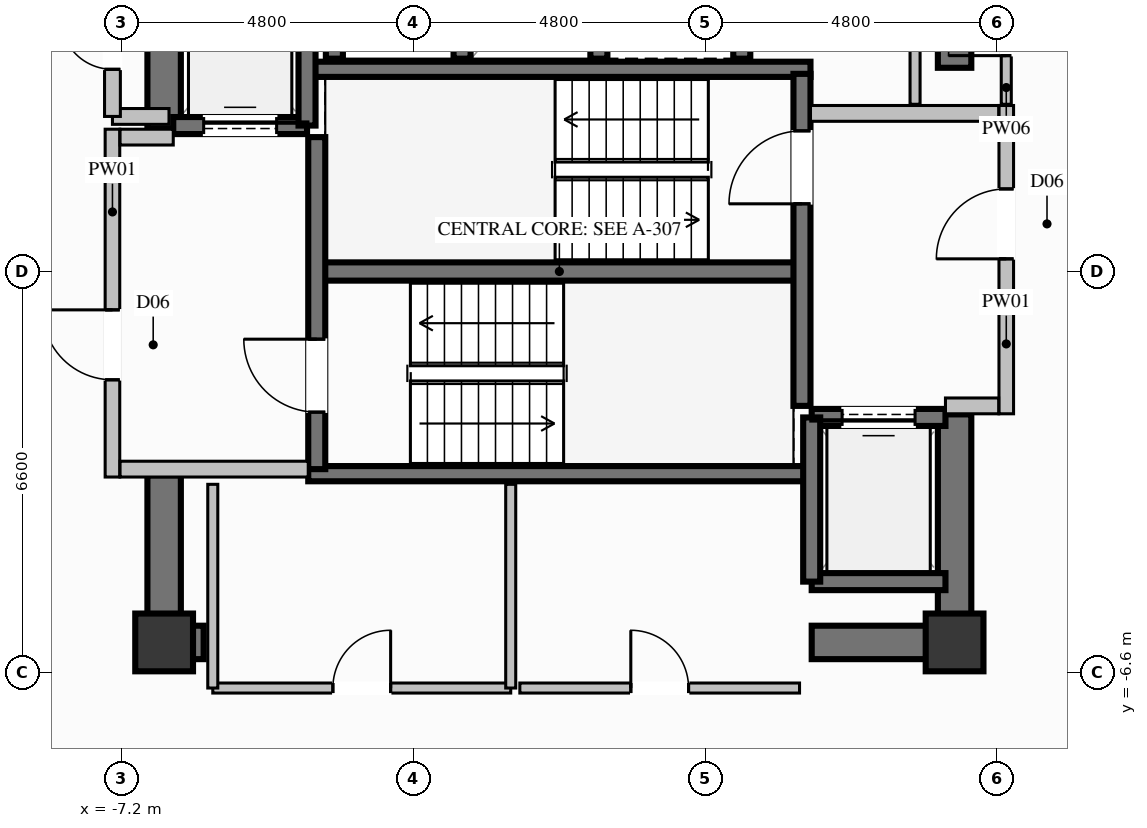
"""IFC4 building model, lengths in metres.
Left out: names, types, materials, properties, quantities, classifications, styles, units other than length and angle.
Written with IfcOpenShell. Run it as: python <this file> out.ifc"""

import sys

from ifc_helpers import new_model, si_unit, direction, frame, frame_2d, origin, origin_2d, place, context, subcontext, project, spatial, rectangle, extrude, element, fill, save


model = new_model("IFC4")
c1 = context("Model", 3, precision=1e-05, world=origin(), true_north=direction((0.0, 1.0)))
c2 = subcontext(c1, "Body", "Model", "MODEL_VIEW")
j1 = project(units=[si_unit("LENGTHUNIT", "METRE"), si_unit("PLANEANGLEUNIT", "RADIAN")], contexts=[c1])
p1 = place(None, origin())
s1 = spatial("IfcSite", under=j1, at=p1, CompositionType="ELEMENT")
p2 = place(p1, origin())
s2 = spatial("IfcBuilding", under=s1, at=p2, CompositionType="ELEMENT")
p3 = place(p2, frame((0.0, 0.0, 212.8)))
s3 = spatial("IfcBuildingStorey", under=s2, at=p3, CompositionType="ELEMENT", Elevation=212.8)
for number, where, z_axis, x_axis in (
    (1, (-6.5, -6.1, 0.0), (0.0, 0.0, 1.0), (1.0, 0.0, 0.0)),
    (2, (6.5, -6.1, 0.0), (0.0, 0.0, 1.0), (1.0, 0.0, 0.0)),
):
    element("IfcColumn", number, at=place(p3, frame(where, z_axis=z_axis, x_axis=x_axis)), inside=s3, PredefinedType="COLUMN", context=c2, shape_type="SweptSolid", body=[
        extrude(rectangle(XDim=0.95, YDim=0.95, at=origin_2d()), origin(), (0.0, 0.0, 1.0), 3.6),
    ])
p4 = place(p3, frame((-3.99, 0.0, 0.0), z_axis=(0.0, 0.0, 1.0), x_axis=(1.0, 0.0, 0.0)))
e3 = element("IfcWall", 3, at=p4, inside=s3, PredefinedType="SHEAR", context=c2, shape_type="SweptSolid", body=[
    extrude(rectangle(XDim=7.98, YDim=0.3, at=frame_2d((3.99, 0.0))), origin(), (0.0, 0.0, 1.0), 3.6),
])
for number, where, z_axis, x_axis in (
    (4, (-4.13, -3.325, 0.0), (0.0, 0.0, 1.0), (1.0, 0.0, 0.0)),
    (5, (-4.13, 3.325, 0.0), (0.0, 0.0, 1.0), (1.0, 0.0, 0.0)),
):
    element("IfcWall", number, at=place(p3, frame(where, z_axis=z_axis, x_axis=x_axis)), inside=s3, PredefinedType="SOLIDWALL", context=c2, shape_type="SweptSolid", body=[
        extrude(rectangle(XDim=8.26, YDim=0.25, at=frame_2d((4.13, 0.0))), origin(), (0.0, 0.0, 1.0), 3.6),
    ])
p5 = place(p3, frame((-6.225, -6.1, 0.0), z_axis=(0.0, 0.0, 1.0), x_axis=(1.0, 0.0, 0.0)))
e6 = element("IfcWall", 6, at=p5, inside=s3, PredefinedType="SHEAR", context=c2, shape_type="SweptSolid", body=[
    extrude(rectangle(XDim=0.375, YDim=0.55, at=frame_2d((0.188, 0.0))), origin(), (0.0, 0.0, 1.0), 3.6),
])
p6 = place(p3, frame((4.15, -6.1, 0.0), z_axis=(0.0, 0.0, 1.0), x_axis=(1.0, 0.0, 0.0)))
e7 = element("IfcWall", 7, at=p6, inside=s3, PredefinedType="SHEAR", context=c2, shape_type="SweptSolid", body=[
    extrude(rectangle(XDim=2.075, YDim=0.55, at=frame_2d((1.038, 0.0))), origin(), (0.0, 0.0, 1.0), 3.6),
])
p7 = place(p3, frame((-6.5, 2.35, 0.0), z_axis=(0.0, 0.0, 1.0), x_axis=(0.0, 1.0, 0.0)))
e8 = element("IfcWall", 8, at=p7, inside=s3, PredefinedType="SHEAR", context=c2, shape_type="SweptSolid", body=[
    extrude(rectangle(XDim=4.025, YDim=0.55, at=frame_2d((2.012, 0.0))), origin(), (0.0, 0.0, 1.0), 3.6),
])
p8 = place(p3, frame((-6.5, -6.375, 0.0), z_axis=(0.0, 0.0, 1.0), x_axis=(0.0, 1.0, 0.0)))
e9 = element("IfcWall", 9, at=p8, inside=s3, PredefinedType="SHEAR", context=c2, shape_type="SweptSolid", body=[
    extrude(rectangle(XDim=3.025, YDim=0.55, at=frame_2d((1.512, 0.0))), origin(), (0.0, 0.0, 1.0), 3.6),
])
p9 = place(p3, frame((6.5, -6.375, 0.0), z_axis=(0.0, 0.0, 1.0), x_axis=(0.0, 1.0, 0.0)))
e10 = element("IfcWall", 10, at=p9, inside=s3, PredefinedType="SHEAR", context=c2, shape_type="SweptSolid", body=[
    extrude(rectangle(XDim=4.025, YDim=0.55, at=frame_2d((2.012, 0.0))), origin(), (0.0, 0.0, 1.0), 3.6),
])
p10 = place(p3, frame((6.5, 3.35, 0.0), z_axis=(0.0, 0.0, 1.0), x_axis=(0.0, 1.0, 0.0)))
e11 = element("IfcWall", 11, at=p10, inside=s3, PredefinedType="SHEAR", context=c2, shape_type="SweptSolid", body=[
    extrude(rectangle(XDim=3.025, YDim=0.55, at=frame_2d((1.512, 0.0))), origin(), (0.0, 0.0, 1.0), 3.6),
])
for number, where, z_axis, x_axis in (
    (12, (-3.7, 6.0, 0.0), (0.0, 0.0, 1.0), (0.0, -1.0, 0.0)),
    (13, (-1.6, 3.5, 0.0), (0.0, 0.0, 1.0), (0.0, 1.0, 0.0)),
    (14, (0.65, 3.5, 0.0), (0.0, 0.0, 1.0), (0.0, 1.0, 0.0)),
    (15, (3.0, 3.5, 0.0), (0.0, 0.0, 1.0), (0.0, 1.0, 0.0)),
):
    element("IfcWall", number, at=place(p3, frame(where, z_axis=z_axis, x_axis=x_axis)), inside=s3, PredefinedType="SOLIDWALL", context=c2, shape_type="SweptSolid", body=[
        extrude(rectangle(XDim=2.5, YDim=0.28, at=frame_2d((1.25, 0.0))), origin(), (0.0, 0.0, 1.0), 3.36),
    ])
p11 = place(p3, frame((-6.35, 2.4, 0.0), z_axis=(0.0, 0.0, 1.0), x_axis=(1.0, 0.0, 0.0)))
e16 = element("IfcWall", 16, at=p11, inside=s3, PredefinedType="SOLIDWALL", context=c2, shape_type="SweptSolid", body=[
    extrude(rectangle(XDim=2.2, YDim=0.28, at=frame_2d((1.1, 0.0))), origin(), (0.0, 0.0, 1.0), 3.36),
])
p12 = place(p11, frame((0.5, 0.0, 0.0)))
e17 = element("IfcOpeningElement", 17, at=p12, cuts=e16, PredefinedType="OPENING", context=c2, shape_type="SweptSolid", body=[
    extrude(rectangle(XDim=1.2, YDim=2.2, at=frame_2d((0.6, 1.1))), frame((0.0, 0.15, 0.0), z_axis=(0.0, -1.0, 0.0), x_axis=(1.0, 0.0, 0.0)), (0.0, 0.0, 1.0), 0.3),
])
p13 = place(p3, frame((-4.15, 2.4, 0.0), z_axis=(0.0, 0.0, 1.0), x_axis=(0.0, 1.0, 0.0)))
e18 = element("IfcWall", 18, at=p13, inside=s3, PredefinedType="SOLIDWALL", context=c2, shape_type="SweptSolid", body=[
    extrude(rectangle(XDim=2.7, YDim=0.28, at=frame_2d((1.35, 0.0))), origin(), (0.0, 0.0, 1.0), 3.36),
])
p14 = place(p3, frame((4.15, -5.1, 0.0), z_axis=(0.0, 0.0, 1.0), x_axis=(1.0, 0.0, 0.0)))
e19 = element("IfcWall", 19, at=p14, inside=s3, PredefinedType="SOLIDWALL", context=c2, shape_type="SweptSolid", body=[
    extrude(rectangle(XDim=2.2, YDim=0.28, at=frame_2d((1.1, 0.0))), origin(), (0.0, 0.0, 1.0), 3.36),
])
p15 = place(p3, frame((6.35, -2.4, 0.0), z_axis=(0.0, 0.0, 1.0), x_axis=(-1.0, 0.0, 0.0)))
e20 = element("IfcWall", 20, at=p15, inside=s3, PredefinedType="SOLIDWALL", context=c2, shape_type="SweptSolid", body=[
    extrude(rectangle(XDim=2.2, YDim=0.28, at=frame_2d((1.1, 0.0))), origin(), (0.0, 0.0, 1.0), 3.36),
])
p16 = place(p15, frame((0.5, 0.0, 0.0)))
e21 = element("IfcOpeningElement", 21, at=p16, cuts=e20, PredefinedType="OPENING", context=c2, shape_type="SweptSolid", body=[
    extrude(rectangle(XDim=1.2, YDim=2.2, at=frame_2d((0.6, 1.1))), frame((0.0, 0.15, 0.0), z_axis=(0.0, -1.0, 0.0), x_axis=(1.0, 0.0, 0.0)), (0.0, 0.0, 1.0), 0.3),
])
p17 = place(p3, frame((4.15, -2.4, 0.0), z_axis=(0.0, 0.0, 1.0), x_axis=(0.0, -1.0, 0.0)))
e22 = element("IfcWall", 22, at=p17, inside=s3, PredefinedType="SOLIDWALL", context=c2, shape_type="SweptSolid", body=[
    extrude(rectangle(XDim=2.7, YDim=0.28, at=frame_2d((1.35, 0.0))), origin(), (0.0, 0.0, 1.0), 3.36),
])
p18 = place(p3, frame((-3.99, -3.25, 0.0), z_axis=(0.0, 0.0, 1.0), x_axis=(0.0, 1.0, 0.0)))
e23 = element("IfcWall", 23, at=p18, inside=s3, PredefinedType="SOLIDWALL", context=c2, shape_type="SweptSolid", body=[
    extrude(rectangle(XDim=5.46, YDim=0.28, at=frame_2d((2.73, 0.0))), origin(), (0.0, 0.0, 1.0), 3.36),
])
p19 = place(p18, frame((0.937, 0.0, 0.0)))
e24 = element("IfcOpeningElement", 24, at=p19, cuts=e23, PredefinedType="OPENING", context=c2, shape_type="SweptSolid", body=[
    extrude(rectangle(XDim=1.2, YDim=2.2, at=frame_2d((0.6, 1.1))), frame((0.0, 0.15, 0.0), z_axis=(0.0, -1.0, 0.0), x_axis=(1.0, 0.0, 0.0)), (0.0, 0.0, 1.0), 0.3),
])
p20 = place(p3, frame((3.99, -2.21, 0.0), z_axis=(0.0, 0.0, 1.0), x_axis=(0.0, 1.0, 0.0)))
e25 = element("IfcWall", 25, at=p20, inside=s3, PredefinedType="SOLIDWALL", context=c2, shape_type="SweptSolid", body=[
    extrude(rectangle(XDim=5.46, YDim=0.28, at=frame_2d((2.73, 0.0))), origin(), (0.0, 0.0, 1.0), 3.36),
])
p21 = place(p20, frame((3.323, 0.0, 0.0)))
e26 = element("IfcOpeningElement", 26, at=p21, cuts=e25, PredefinedType="OPENING", context=c2, shape_type="SweptSolid", body=[
    extrude(rectangle(XDim=1.2, YDim=2.2, at=frame_2d((0.6, 1.1))), frame((0.0, 0.15, 0.0), z_axis=(0.0, -1.0, 0.0), x_axis=(1.0, 0.0, 0.0)), (0.0, 0.0, 1.0), 0.3),
])
p22 = place(p3, frame((-7.35, -3.38, 0.0), z_axis=(0.0, 0.0, 1.0), x_axis=(0.0, 1.0, 0.0)))
e27 = element("IfcWall", 27, at=p22, inside=s3, PredefinedType="PARTITIONING", context=c2, shape_type="SweptSolid", body=[
    extrude(rectangle(XDim=5.72, YDim=0.24, at=frame_2d((2.86, 0.0))), origin(), (0.0, 0.0, 1.0), 2.445),
])
p23 = place(p22, frame((1.599, 0.0, 0.0)))
e28 = element("IfcOpeningElement", 28, at=p23, cuts=e27, PredefinedType="OPENING", context=c2, shape_type="SweptSolid", body=[
    extrude(rectangle(XDim=1.15, YDim=2.2, at=frame_2d((0.575, 1.1))), frame((0.0, 0.13, 0.0), z_axis=(0.0, -1.0, 0.0), x_axis=(1.0, 0.0, 0.0)), (0.0, 0.0, 1.0), 0.26),
])
p24 = place(p3, frame((-7.225, -3.25, 0.0), z_axis=(0.0, 0.0, 1.0), x_axis=(1.0, 0.0, 0.0)))
e29 = element("IfcWall", 29, at=p24, inside=s3, PredefinedType="PARTITIONING", context=c2, shape_type="SweptSolid", body=[
    extrude(rectangle(XDim=3.095, YDim=0.26, at=frame_2d((1.548, 0.0))), origin(), (0.0, 0.0, 1.0), 3.36),
])
p25 = place(p3, frame((-7.225, 2.21, 0.0), z_axis=(0.0, 0.0, 1.0), x_axis=(1.0, 0.0, 0.0)))
e30 = element("IfcWall", 30, at=p25, inside=s3, PredefinedType="PARTITIONING", context=c2, shape_type="SweptSolid", body=[
    extrude(rectangle(XDim=0.875, YDim=0.26, at=frame_2d((0.438, 0.0))), origin(), (0.0, 0.0, 1.0), 3.36),
])
p26 = place(p3, frame((7.35, -2.34, 0.0), z_axis=(0.0, 0.0, 1.0), x_axis=(0.0, 1.0, 0.0)))
e31 = element("IfcWall", 31, at=p26, inside=s3, PredefinedType="PARTITIONING", context=c2, shape_type="SweptSolid", body=[
    extrude(rectangle(XDim=5.07, YDim=0.24, at=frame_2d((2.535, 0.0))), origin(), (0.0, 0.0, 1.0), 2.445),
])
p27 = place(p26, frame((2.548, 0.0, 0.0)))
e32 = element("IfcOpeningElement", 32, at=p27, cuts=e31, PredefinedType="OPENING", context=c2, shape_type="SweptSolid", body=[
    extrude(rectangle(XDim=1.15, YDim=2.2, at=frame_2d((0.575, 1.1))), frame((0.0, 0.13, 0.0), z_axis=(0.0, -1.0, 0.0), x_axis=(1.0, 0.0, 0.0)), (0.0, 0.0, 1.0), 0.26),
])
p28 = place(p3, frame((6.35, -2.21, 0.0), z_axis=(0.0, 0.0, 1.0), x_axis=(1.0, 0.0, 0.0)))
e33 = element("IfcWall", 33, at=p28, inside=s3, PredefinedType="PARTITIONING", context=c2, shape_type="SweptSolid", body=[
    extrude(rectangle(XDim=0.875, YDim=0.26, at=frame_2d((0.438, 0.0))), origin(), (0.0, 0.0, 1.0), 3.36),
])
p29 = place(p3, frame((4.13, 2.6, 0.0), z_axis=(0.0, 0.0, 1.0), x_axis=(1.0, 0.0, 0.0)))
e34 = element("IfcWall", 34, at=p29, inside=s3, PredefinedType="PARTITIONING", context=c2, shape_type="SweptSolid", body=[
    extrude(rectangle(XDim=3.095, YDim=0.26, at=frame_2d((1.548, 0.0))), origin(), (0.0, 0.0, 1.0), 3.36),
])
p30 = place(p3, frame((-7.35, 2.55, 0.0), z_axis=(0.0, 0.0, 1.0), x_axis=(1.0, 0.0, 0.0)))
e35 = element("IfcWall", 35, at=p30, inside=s3, PredefinedType="PARTITIONING", context=c2, shape_type="SweptSolid", body=[
    extrude(rectangle(XDim=0.93, YDim=0.26, at=frame_2d((0.465, 0.0))), origin(), (0.0, 0.0, 1.0), 3.36),
])
p31 = place(p3, frame((-7.35, 2.55, 0.0), z_axis=(0.0, 0.0, 1.0), x_axis=(0.0, 1.0, 0.0)))
e36 = element("IfcWall", 36, at=p31, inside=s3, PredefinedType="PARTITIONING", context=c2, shape_type="SweptSolid", body=[
    extrude(rectangle(XDim=2.4, YDim=0.26, at=frame_2d((1.2, 0.0))), origin(), (0.0, 0.0, 1.0), 2.445),
])
p32 = place(p31, frame((0.775, 0.0, 0.0)))
e37 = element("IfcOpeningElement", 37, at=p32, cuts=e36, PredefinedType="OPENING", context=c2, shape_type="SweptSolid", body=[
    extrude(rectangle(XDim=0.85, YDim=2.05, at=frame_2d((0.425, 1.025))), frame((0.0, 0.14, 0.0), z_axis=(0.0, -1.0, 0.0), x_axis=(1.0, 0.0, 0.0)), (0.0, 0.0, 1.0), 0.28),
])
p33 = place(p3, frame((7.35, 2.75, 0.0), z_axis=(0.0, 0.0, 1.0), x_axis=(0.0, 1.0, 0.0)))
e38 = element("IfcWall", 38, at=p33, inside=s3, PredefinedType="PARTITIONING", context=c2, shape_type="SweptSolid", body=[
    extrude(rectangle(XDim=2.55, YDim=0.165, at=frame_2d((1.275, 0.0))), origin(), (0.0, 0.0, 1.0), 3.36),
])
p34 = place(p33, frame((0.8, 0.0, 0.0)))
e39 = element("IfcOpeningElement", 39, at=p34, cuts=e38, PredefinedType="OPENING", context=c2, shape_type="SweptSolid", body=[
    extrude(rectangle(XDim=0.95, YDim=2.1, at=frame_2d((0.475, 1.05))), frame((0.0, 0.093, 0.0), z_axis=(0.0, -1.0, 0.0), x_axis=(1.0, 0.0, 0.0)), (0.0, 0.0, 1.0), 0.185),
])
p35 = place(p3, frame((5.85, 5.3, 0.0), z_axis=(0.0, 0.0, 1.0), x_axis=(0.0, -1.0, 0.0)))
e40 = element("IfcWall", 40, at=p35, inside=s3, PredefinedType="PARTITIONING", context=c2, shape_type="SweptSolid", body=[
    extrude(rectangle(XDim=2.55, YDim=0.165, at=frame_2d((1.275, 0.0))), origin(), (0.0, 0.0, 1.0), 2.445),
])
p36 = place(p3, frame((-5.7, -6.85, 0.0), z_axis=(0.0, 0.0, 1.0), x_axis=(1.0, 0.0, 0.0)))
e41 = element("IfcWall", 41, at=p36, inside=s3, PredefinedType="PARTITIONING", context=c2, shape_type="SweptSolid", body=[
    extrude(rectangle(XDim=4.9, YDim=0.165, at=frame_2d((2.45, 0.0))), origin(), (0.0, 0.0, 1.0), 2.445),
])
p37 = place(p36, frame((1.975, 0.0, 0.0)))
e42 = element("IfcOpeningElement", 42, at=p37, cuts=e41, PredefinedType="OPENING", context=c2, shape_type="SweptSolid", body=[
    extrude(rectangle(XDim=0.95, YDim=2.1, at=frame_2d((0.475, 1.05))), frame((0.0, 0.093, 0.0), z_axis=(0.0, -1.0, 0.0), x_axis=(1.0, 0.0, 0.0)), (0.0, 0.0, 1.0), 0.185),
])
p38 = place(p3, frame((-0.8, -6.85, 0.0), z_axis=(0.0, 0.0, 1.0), x_axis=(0.0, 1.0, 0.0)))
e43 = element("IfcWall", 43, at=p38, inside=s3, PredefinedType="PARTITIONING", context=c2, shape_type="SweptSolid", body=[
    extrude(rectangle(XDim=3.35, YDim=0.165, at=frame_2d((1.675, 0.0))), origin(), (0.0, 0.0, 1.0), 3.36),
])
p39 = place(p3, frame((-5.7, -3.5, 0.0), z_axis=(0.0, 0.0, 1.0), x_axis=(0.0, -1.0, 0.0)))
e44 = element("IfcWall", 44, at=p39, inside=s3, PredefinedType="PARTITIONING", context=c2, shape_type="SweptSolid", body=[
    extrude(rectangle(XDim=3.35, YDim=0.165, at=frame_2d((1.675, 0.0))), origin(), (0.0, 0.0, 1.0), 2.445),
])
p40 = place(p3, frame((-0.65, -6.85, 0.0), z_axis=(0.0, 0.0, 1.0), x_axis=(1.0, 0.0, 0.0)))
e45 = element("IfcWall", 45, at=p40, inside=s3, PredefinedType="PARTITIONING", context=c2, shape_type="SweptSolid", body=[
    extrude(rectangle(XDim=4.6, YDim=0.165, at=frame_2d((2.3, 0.0))), origin(), (0.0, 0.0, 1.0), 2.445),
])
p41 = place(p40, frame((1.825, 0.0, 0.0)))
e46 = element("IfcOpeningElement", 46, at=p41, cuts=e45, PredefinedType="OPENING", context=c2, shape_type="SweptSolid", body=[
    extrude(rectangle(XDim=0.95, YDim=2.1, at=frame_2d((0.475, 1.05))), frame((0.0, 0.093, 0.0), z_axis=(0.0, -1.0, 0.0), x_axis=(1.0, 0.0, 0.0)), (0.0, 0.0, 1.0), 0.185),
])
p42 = place(p12, origin())
e47 = element("IfcDoor", 47, at=p42, inside=s3, OperationType="SLIDING_TO_LEFT", PredefinedType="DOOR", context=c2, shape_type="SweptSolid", body=[
    extrude(rectangle(XDim=1.2, YDim=2.2, at=frame_2d((0.6, 1.1))), frame((0.0, 0.025, 0.0), z_axis=(0.0, -1.0, 0.0), x_axis=(1.0, 0.0, 0.0)), (0.0, 0.0, 1.0), 0.05),
])
fill(e17, e47)
p43 = place(p16, origin())
e48 = element("IfcDoor", 48, at=p43, inside=s3, OperationType="SLIDING_TO_LEFT", PredefinedType="DOOR", context=c2, shape_type="SweptSolid", body=[
    extrude(rectangle(XDim=1.2, YDim=2.2, at=frame_2d((0.6, 1.1))), frame((0.0, 0.025, 0.0), z_axis=(0.0, -1.0, 0.0), x_axis=(1.0, 0.0, 0.0)), (0.0, 0.0, 1.0), 0.05),
])
fill(e21, e48)
p44 = place(p19, origin())
e49 = element("IfcDoor", 49, at=p44, inside=s3, OperationType="SINGLE_SWING_RIGHT", PredefinedType="DOOR", context=c2, shape_type="SweptSolid", body=[
    extrude(rectangle(XDim=1.2, YDim=2.2, at=frame_2d((0.6, 1.1))), frame((0.0, 0.025, 0.0), z_axis=(0.0, -1.0, 0.0), x_axis=(1.0, 0.0, 0.0)), (0.0, 0.0, 1.0), 0.05),
])
fill(e24, e49)
p45 = place(p21, origin())
e50 = element("IfcDoor", 50, at=p45, inside=s3, OperationType="SINGLE_SWING_LEFT", PredefinedType="DOOR", context=c2, shape_type="SweptSolid", body=[
    extrude(rectangle(XDim=1.2, YDim=2.2, at=frame_2d((0.6, 1.1))), frame((0.0, 0.025, 0.0), z_axis=(0.0, -1.0, 0.0), x_axis=(1.0, 0.0, 0.0)), (0.0, 0.0, 1.0), 0.05),
])
fill(e26, e50)
p46 = place(p23, origin())
e51 = element("IfcDoor", 51, at=p46, inside=s3, OperationType="SINGLE_SWING_RIGHT", PredefinedType="DOOR", context=c2, shape_type="SweptSolid", body=[
    extrude(rectangle(XDim=1.15, YDim=2.2, at=frame_2d((0.575, 1.1))), frame((0.0, 0.025, 0.0), z_axis=(0.0, -1.0, 0.0), x_axis=(1.0, 0.0, 0.0)), (0.0, 0.0, 1.0), 0.05),
])
fill(e28, e51)
p47 = place(p27, origin())
e52 = element("IfcDoor", 52, at=p47, inside=s3, OperationType="SINGLE_SWING_LEFT", PredefinedType="DOOR", context=c2, shape_type="SweptSolid", body=[
    extrude(rectangle(XDim=1.15, YDim=2.2, at=frame_2d((0.575, 1.1))), frame((0.0, 0.025, 0.0), z_axis=(0.0, -1.0, 0.0), x_axis=(1.0, 0.0, 0.0)), (0.0, 0.0, 1.0), 0.05),
])
fill(e32, e52)
p48 = place(p32, origin())
e53 = element("IfcDoor", 53, at=p48, inside=s3, OperationType="SINGLE_SWING_RIGHT", PredefinedType="DOOR", context=c2, shape_type="SweptSolid", body=[
    extrude(rectangle(XDim=0.85, YDim=2.05, at=frame_2d((0.425, 1.025))), frame((0.0, 0.025, 0.0), z_axis=(0.0, -1.0, 0.0), x_axis=(1.0, 0.0, 0.0)), (0.0, 0.0, 1.0), 0.05),
])
fill(e37, e53)
p49 = place(p34, origin())
e54 = element("IfcDoor", 54, at=p49, inside=s3, OperationType="SINGLE_SWING_LEFT", PredefinedType="DOOR", context=c2, shape_type="SweptSolid", body=[
    extrude(rectangle(XDim=0.95, YDim=2.1, at=frame_2d((0.475, 1.05))), frame((0.0, 0.025, 0.0), z_axis=(0.0, -1.0, 0.0), x_axis=(1.0, 0.0, 0.0)), (0.0, 0.0, 1.0), 0.05),
])
fill(e39, e54)
p50 = place(p37, origin())
e55 = element("IfcDoor", 55, at=p50, inside=s3, OperationType="SINGLE_SWING_RIGHT", PredefinedType="DOOR", context=c2, shape_type="SweptSolid", body=[
    extrude(rectangle(XDim=0.95, YDim=2.1, at=frame_2d((0.475, 1.05))), frame((0.0, 0.025, 0.0), z_axis=(0.0, -1.0, 0.0), x_axis=(1.0, 0.0, 0.0)), (0.0, 0.0, 1.0), 0.05),
])
fill(e42, e55)
p51 = place(p41, origin())
e56 = element("IfcDoor", 56, at=p51, inside=s3, OperationType="SINGLE_SWING_LEFT", PredefinedType="DOOR", context=c2, shape_type="SweptSolid", body=[
    extrude(rectangle(XDim=0.95, YDim=2.1, at=frame_2d((0.475, 1.05))), frame((0.0, 0.025, 0.0), z_axis=(0.0, -1.0, 0.0), x_axis=(1.0, 0.0, 0.0)), (0.0, 0.0, 1.0), 0.05),
])
fill(e46, e56)
save(model, sys.argv[1])
